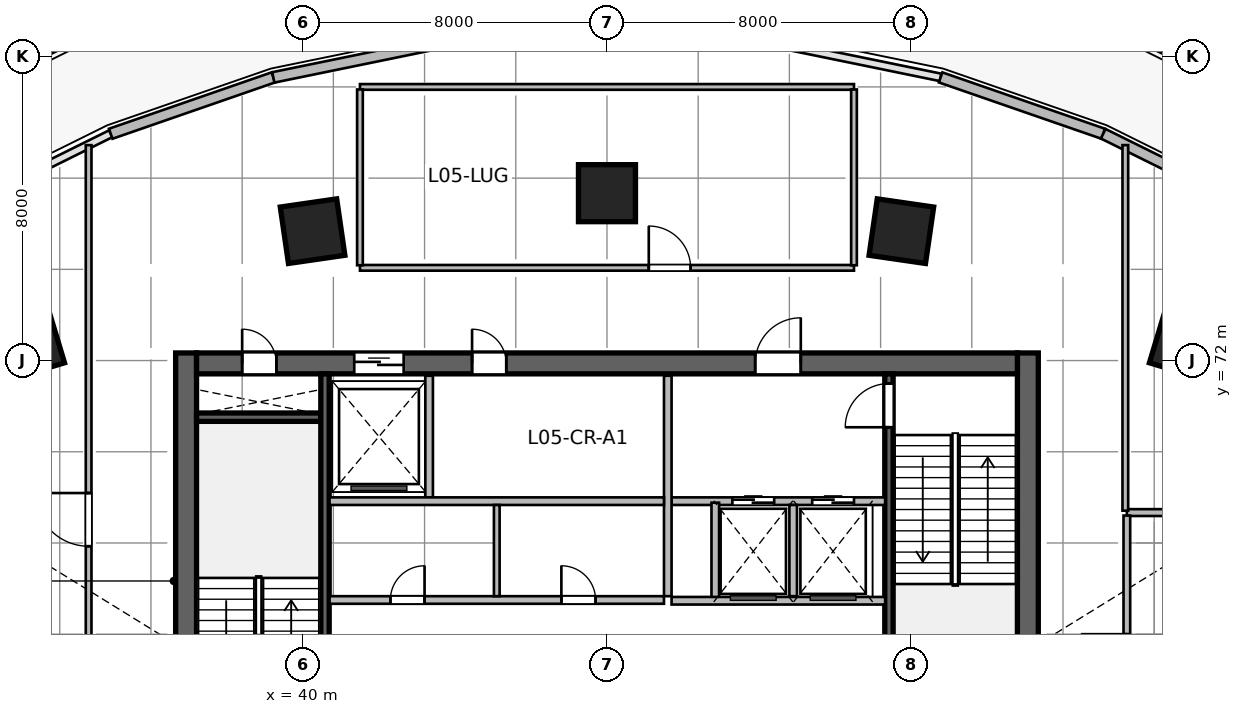
"""IFC4 building model, lengths in metres.
Left out: names, types, materials, properties, quantities, classifications, styles, units other than length and angle.
Written with IfcOpenShell. Run it as: python <this file> out.ifc"""

import sys

from ifc_helpers import new_model, si_unit, direction, frame, frame_2d, origin, origin_2d, place, context, subcontext, project, spatial, rectangle, extrude, source, transform, mapped, element, fill, save


model = new_model("IFC4")
c1 = context("Model", 3, precision=1e-05, world=origin(), true_north=direction((0.0, 1.0)))
c2 = subcontext(c1, "Body", "Model", "MODEL_VIEW")
j1 = project(units=[si_unit("LENGTHUNIT", "METRE"), si_unit("PLANEANGLEUNIT", "RADIAN")], contexts=[c1])
p1 = place(None, origin())
s1 = spatial("IfcSite", under=j1, at=p1, CompositionType="ELEMENT")
p2 = place(p1, origin())
s2 = spatial("IfcBuilding", under=s1, at=p2, CompositionType="ELEMENT")
p3 = place(p2, frame((0.0, 0.0, 30.0)))
s3 = spatial("IfcBuildingStorey", under=s2, at=p3, CompositionType="ELEMENT", Elevation=30.0)
m1 = source(origin(), c2, "Body", "SweptSolid", [
    extrude(rectangle(XDim=12.0, YDim=0.55, at=frame_2d((6.0, 0.0))), origin(), (0.0, 0.0, 1.0), 5.4),
])
for number, where, z_axis, x_axis in (
    (1, (36.925, 60.2, 0.0), (0.0, 0.0, 1.0), (0.0, 1.0, 0.0)),
    (2, (59.075, 60.2, 0.0), (0.0, 0.0, 1.0), (0.0, 1.0, 0.0)),
):
    element("IfcWall", number, at=place(p3, frame(where, z_axis=z_axis, x_axis=x_axis)), inside=s3, PredefinedType="SHEAR", context=c2, shape_type="MappedRepresentation", body=[
        mapped(m1, transform((0.0, 0.0, 0.0), scale=1.0)),
    ])
m2 = source(origin(), c2, "Body", "SweptSolid", [
    extrude(rectangle(XDim=21.6, YDim=0.55, at=frame_2d((10.8, 0.0))), origin(), (0.0, 0.0, 1.0), 5.4),
])
p4 = place(p3, frame((37.2, 71.925, 0.0), z_axis=(0.0, 0.0, 1.0), x_axis=(1.0, 0.0, 0.0)))
e3 = element("IfcWall", 3, at=p4, inside=s3, PredefinedType="SHEAR", context=c2, shape_type="MappedRepresentation", body=[
    mapped(m2, transform((0.0, 0.0, 0.0), scale=1.0)),
])
p5 = place(p4, frame((1.2, 0.0, 0.0)))
e4 = element("IfcOpeningElement", 4, at=p5, cuts=e3, PredefinedType="OPENING", context=c2, shape_type="SweptSolid", body=[
    extrude(rectangle(XDim=0.9, YDim=2.1, at=frame_2d((0.45, 1.05))), frame((0.0, 0.285, 0.0), z_axis=(0.0, -1.0, 0.0), x_axis=(1.0, 0.0, 0.0)), (0.0, 0.0, 1.0), 0.57),
])
p6 = place(p4, frame((14.7, 0.0, 0.0)))
e5 = element("IfcOpeningElement", 5, at=p6, cuts=e3, PredefinedType="OPENING", context=c2, shape_type="SweptSolid", body=[
    extrude(rectangle(XDim=1.2, YDim=2.15, at=frame_2d((0.6, 1.075))), frame((0.0, 0.285, 0.0), z_axis=(0.0, -1.0, 0.0), x_axis=(1.0, 0.0, 0.0)), (0.0, 0.0, 1.0), 0.57),
])
p7 = place(p4, frame((4.15, 0.0, 0.0)))
e6 = element("IfcOpeningElement", 6, at=p7, cuts=e3, PredefinedType="OPENING", context=c2, shape_type="SweptSolid", body=[
    extrude(rectangle(XDim=1.3, YDim=2.15, at=frame_2d((0.65, 1.075))), frame((0.0, 0.285, 0.0), z_axis=(0.0, -1.0, 0.0), x_axis=(1.0, 0.0, 0.0)), (0.0, 0.0, 1.0), 0.57),
])
p8 = place(p4, frame((7.25, 0.0, 0.0)))
e7 = element("IfcOpeningElement", 7, at=p8, cuts=e3, PredefinedType="OPENING", context=c2, shape_type="SweptSolid", body=[
    extrude(rectangle(XDim=0.9, YDim=2.1, at=frame_2d((0.45, 1.05))), frame((0.0, 0.285, 0.0), z_axis=(0.0, -1.0, 0.0), x_axis=(1.0, 0.0, 0.0)), (0.0, 0.0, 1.0), 0.57),
])
m3 = source(origin(), c2, "Body", "SweptSolid", [
    extrude(rectangle(XDim=3.27, YDim=0.22, at=frame_2d((1.635, 0.0))), origin(), (0.0, 0.0, 1.0), 5.4),
])
p9 = place(p3, frame((37.2, 70.51, 0.0), z_axis=(0.0, 0.0, 1.0), x_axis=(1.0, 0.0, 0.0)))
e8 = element("IfcWall", 8, at=p9, inside=s3, PredefinedType="SHEAR", context=c2, shape_type="MappedRepresentation", body=[
    mapped(m3, transform((0.0, 0.0, 0.0), scale=1.0)),
])
m4 = source(origin(), c2, "Body", "SweptSolid", [
    extrude(rectangle(XDim=10.9, YDim=0.22, at=frame_2d((5.45, 0.0))), origin(), (0.0, 0.0, 1.0), 5.4),
])
p10 = place(p3, frame((40.58, 60.75, 0.0), z_axis=(0.0, 0.0, 1.0), x_axis=(0.0, 1.0, 0.0)))
e9 = element("IfcWall", 9, at=p10, inside=s3, PredefinedType="SHEAR", context=c2, shape_type="MappedRepresentation", body=[
    mapped(m4, transform((0.0, 0.0, 0.0), scale=1.0)),
])
p11 = place(p3, frame((55.42, 60.75, 0.0), z_axis=(0.0, 0.0, 1.0), x_axis=(0.0, 1.0, 0.0)))
e10 = element("IfcWall", 10, at=p11, inside=s3, PredefinedType="SHEAR", context=c2, shape_type="MappedRepresentation", body=[
    mapped(m4, transform((0.0, 0.0, 0.0), scale=1.0)),
])
p12 = place(p11, frame((9.495, 0.0, 0.0)))
e11 = element("IfcOpeningElement", 11, at=p12, cuts=e10, PredefinedType="OPENING", context=c2, shape_type="SweptSolid", body=[
    extrude(rectangle(XDim=1.15, YDim=2.15, at=frame_2d((0.575, 1.075))), frame((0.0, 0.12, 0.0), z_axis=(0.0, -1.0, 0.0), x_axis=(1.0, 0.0, 0.0)), (0.0, 0.0, 1.0), 0.24),
])
m5 = source(origin(), c2, "Body", "SweptSolid", [
    extrude(rectangle(XDim=1.5, YDim=1.5, at=origin_2d()), origin(), (0.0, 0.0, 1.0), 5.4),
])
for number, where, z_axis, x_axis in (
    (12, (32.791, 72.442, 0.0), (0.0, 0.0, 1.0), (-0.289, 0.957, 0.0)),
    (13, (40.253, 75.404, 0.0), (0.0, 0.0, 1.0), (-0.143, 0.99, 0.0)),
    (14, (48.0, 76.404, 0.0), (0.0, 0.0, 1.0), (0.0, 1.0, 0.0)),
    (15, (55.747, 75.404, 0.0), (0.0, 0.0, 1.0), (0.143, 0.99, 0.0)),
    (16, (63.209, 72.442, 0.0), (0.0, 0.0, 1.0), (0.289, 0.957, 0.0)),
):
    element("IfcColumn", number, at=place(p3, frame(where, z_axis=z_axis, x_axis=x_axis)), inside=s3, PredefinedType="COLUMN", context=c2, shape_type="MappedRepresentation", body=[
        mapped(m5, transform((0.0, 0.0, 0.0), scale=1.0)),
    ])
m6 = source(origin(), c2, "Body", "SweptSolid", [
    extrude(rectangle(XDim=4.528, YDim=0.28, at=frame_2d((2.264, 0.0))), origin(), (0.0, 0.0, 1.0), 5.16),
])
p13 = place(p3, frame((34.942, 77.968, 0.0), z_axis=(0.0, 0.0, 1.0), x_axis=(0.944875124863, 0.327430906322, 0.0)))
e17 = element("IfcWall", 17, at=p13, inside=s3, PredefinedType="SOLIDWALL", context=c2, shape_type="MappedRepresentation", body=[
    mapped(m6, transform((0.0, 0.0, 0.0), scale=1.0)),
])
m7 = source(origin(), c2, "Body", "SweptSolid", [
    extrude(rectangle(XDim=4.458, YDim=0.28, at=frame_2d((2.229, 0.0))), origin(), (0.0, 0.0, 1.0), 5.16),
])
p14 = place(p3, frame((39.22, 79.45, 0.0), z_axis=(0.0, 0.0, 1.0), x_axis=(0.979608504488, 0.200915847893, 0.0)))
e18 = element("IfcWall", 18, at=p14, inside=s3, PredefinedType="SOLIDWALL", context=c2, shape_type="MappedRepresentation", body=[
    mapped(m7, transform((0.0, 0.0, 0.0), scale=1.0)),
])
p15 = place(p3, frame((56.78, 79.45, 0.0), z_axis=(0.0, 0.0, 1.0), x_axis=(0.944875124863, -0.327430906322, 0.0)))
e19 = element("IfcWall", 19, at=p15, inside=s3, PredefinedType="SOLIDWALL", context=c2, shape_type="MappedRepresentation", body=[
    mapped(m6, transform((0.0, 0.0, 0.0), scale=1.0)),
])
m8 = source(origin(), c2, "Body", "SweptSolid", [
    extrude(rectangle(XDim=4.628, YDim=0.28, at=frame_2d((2.314, 0.0))), origin(), (0.0, 0.0, 1.0), 5.16),
])
p16 = place(p3, frame((61.058, 77.968, 0.0), z_axis=(0.0, 0.0, 1.0), x_axis=(0.895972868577, -0.444108791597, 0.0)))
e20 = element("IfcWall", 20, at=p16, inside=s3, PredefinedType="SOLIDWALL", context=c2, shape_type="MappedRepresentation", body=[
    mapped(m8, transform((0.0, 0.0, 0.0), scale=1.0)),
])
m9 = source(origin(), c2, "Body", "SweptSolid", [
    extrude(rectangle(XDim=5.62, YDim=0.2, at=frame_2d((2.81, 0.0))), origin(), (0.0, 0.0, 1.0), 5.16),
])
p17 = place(p3, frame((49.7, 68.3, 0.0), z_axis=(0.0, 0.0, 1.0), x_axis=(1.0, 0.0, 0.0)))
e21 = element("IfcWall", 21, at=p17, inside=s3, PredefinedType="SOLIDWALL", context=c2, shape_type="MappedRepresentation", body=[
    mapped(m9, transform((0.0, 0.0, 0.0), scale=1.0)),
])
p18 = place(p17, frame((1.6, 0.0, 0.0)))
e22 = element("IfcOpeningElement", 22, at=p18, cuts=e21, PredefinedType="OPENING", context=c2, shape_type="SweptSolid", body=[
    extrude(rectangle(XDim=1.1, YDim=2.15, at=frame_2d((0.55, 1.075))), frame((0.0, 0.11, 0.0), z_axis=(0.0, -1.0, 0.0), x_axis=(1.0, 0.0, 0.0)), (0.0, 0.0, 1.0), 0.22),
])
p19 = place(p17, frame((3.7, 0.0, 0.0)))
e23 = element("IfcOpeningElement", 23, at=p19, cuts=e21, PredefinedType="OPENING", context=c2, shape_type="SweptSolid", body=[
    extrude(rectangle(XDim=1.1, YDim=2.15, at=frame_2d((0.55, 1.075))), frame((0.0, 0.11, 0.0), z_axis=(0.0, -1.0, 0.0), x_axis=(1.0, 0.0, 0.0)), (0.0, 0.0, 1.0), 0.22),
])
m10 = source(origin(), c2, "Body", "SweptSolid", [
    extrude(rectangle(XDim=5.8, YDim=0.2, at=frame_2d((2.9, 0.0))), origin(), (0.0, 0.0, 1.0), 5.16),
])
p20 = place(p3, frame((49.6, 65.8, 0.0), z_axis=(0.0, 0.0, 1.0), x_axis=(0.0, 1.0, 0.0)))
e24 = element("IfcWall", 24, at=p20, inside=s3, PredefinedType="SOLIDWALL", context=c2, shape_type="MappedRepresentation", body=[
    mapped(m10, transform((0.0, 0.0, 0.0), scale=1.0)),
])
m11 = source(origin(), c2, "Body", "SweptSolid", [
    extrude(rectangle(XDim=2.58, YDim=0.2, at=frame_2d((1.29, 0.0))), origin(), (0.0, 0.0, 1.0), 5.16),
])
p21 = place(p3, frame((50.85, 65.68, 0.0), z_axis=(0.0, 0.0, 1.0), x_axis=(0.0, 1.0, 0.0)))
e25 = element("IfcWall", 25, at=p21, inside=s3, PredefinedType="SOLIDWALL", context=c2, shape_type="MappedRepresentation", body=[
    mapped(m11, transform((0.0, 0.0, 0.0), scale=1.0)),
])
m12 = source(origin(), c2, "Body", "SweptSolid", [
    extrude(rectangle(XDim=2.4, YDim=0.2, at=frame_2d((1.2, 0.0))), origin(), (0.0, 0.0, 1.0), 5.16),
])
p22 = place(p3, frame((52.9, 65.8, 0.0), z_axis=(0.0, 0.0, 1.0), x_axis=(0.0, 1.0, 0.0)))
e26 = element("IfcWall", 26, at=p22, inside=s3, PredefinedType="SOLIDWALL", context=c2, shape_type="MappedRepresentation", body=[
    mapped(m12, transform((0.0, 0.0, 0.0), scale=1.0)),
])
p23 = place(p3, frame((49.7, 65.68, 0.0), z_axis=(0.0, 0.0, 1.0), x_axis=(1.0, 0.0, 0.0)))
e27 = element("IfcWall", 27, at=p23, inside=s3, PredefinedType="SOLIDWALL", context=c2, shape_type="MappedRepresentation", body=[
    mapped(m9, transform((0.0, 0.0, 0.0), scale=1.0)),
])
m13 = source(origin(), c2, "Body", "SweptSolid", [
    extrude(rectangle(XDim=3.2, YDim=0.2, at=frame_2d((1.6, 0.0))), origin(), (0.0, 0.0, 1.0), 5.16),
])
p24 = place(p3, frame((43.32, 68.4, 0.0), z_axis=(0.0, 0.0, 1.0), x_axis=(0.0, 1.0, 0.0)))
e28 = element("IfcWall", 28, at=p24, inside=s3, PredefinedType="SOLIDWALL", context=c2, shape_type="MappedRepresentation", body=[
    mapped(m13, transform((0.0, 0.0, 0.0), scale=1.0)),
])
m14 = source(origin(), c2, "Body", "SweptSolid", [
    extrude(rectangle(XDim=8.8, YDim=0.2, at=frame_2d((4.4, 0.0))), origin(), (0.0, 0.0, 1.0), 5.16),
])
p25 = place(p3, frame((40.7, 68.3, 0.0), z_axis=(0.0, 0.0, 1.0), x_axis=(1.0, 0.0, 0.0)))
e29 = element("IfcWall", 29, at=p25, inside=s3, PredefinedType="SOLIDWALL", context=c2, shape_type="MappedRepresentation", body=[
    mapped(m14, transform((0.0, 0.0, 0.0), scale=1.0)),
])
p26 = place(p3, frame((40.7, 65.7, 0.0), z_axis=(0.0, 0.0, 1.0), x_axis=(1.0, 0.0, 0.0)))
e30 = element("IfcWall", 30, at=p26, inside=s3, PredefinedType="SOLIDWALL", context=c2, shape_type="MappedRepresentation", body=[
    mapped(m14, transform((0.0, 0.0, 0.0), scale=1.0)),
])
p27 = place(p26, frame((1.6, 0.0, 0.0)))
e31 = element("IfcOpeningElement", 31, at=p27, cuts=e30, PredefinedType="OPENING", context=c2, shape_type="SweptSolid", body=[
    extrude(rectangle(XDim=0.9, YDim=2.1, at=frame_2d((0.45, 1.05))), frame((0.0, 0.11, 0.0), z_axis=(0.0, -1.0, 0.0), x_axis=(1.0, 0.0, 0.0)), (0.0, 0.0, 1.0), 0.22),
])
p28 = place(p26, frame((6.1, 0.0, 0.0)))
e32 = element("IfcOpeningElement", 32, at=p28, cuts=e30, PredefinedType="OPENING", context=c2, shape_type="SweptSolid", body=[
    extrude(rectangle(XDim=0.9, YDim=2.1, at=frame_2d((0.45, 1.05))), frame((0.0, 0.11, 0.0), z_axis=(0.0, -1.0, 0.0), x_axis=(1.0, 0.0, 0.0)), (0.0, 0.0, 1.0), 0.22),
])
m15 = source(origin(), c2, "Body", "SweptSolid", [
    extrude(rectangle(XDim=2.4, YDim=0.15, at=frame_2d((1.2, 0.0))), origin(), (0.0, 0.0, 1.0), 5.16),
])
p29 = place(p3, frame((45.1, 65.8, 0.0), z_axis=(0.0, 0.0, 1.0), x_axis=(0.0, 1.0, 0.0)))
e33 = element("IfcWall", 33, at=p29, inside=s3, PredefinedType="PARTITIONING", context=c2, shape_type="MappedRepresentation", body=[
    mapped(m15, transform((0.0, 0.0, 0.0), scale=1.0)),
])
m16 = source(origin(), c2, "Body", "SweptSolid", [
    extrude(rectangle(XDim=9.82, YDim=0.18, at=frame_2d((4.91, 0.0))), origin(), (0.0, 0.0, 1.0), 5.16),
])
p30 = place(p3, frame((61.68, 68.0, 0.0), z_axis=(0.0, 0.0, 1.0), x_axis=(1.0, 0.0, 0.0)))
e34 = element("IfcWall", 34, at=p30, inside=s3, PredefinedType="PLUMBINGWALL", context=c2, shape_type="MappedRepresentation", body=[
    mapped(m16, transform((0.0, 0.0, 0.0), scale=1.0)),
])
m17 = source(origin(), c2, "Body", "SweptSolid", [
    extrude(rectangle(XDim=7.443, YDim=0.175, at=frame_2d((3.721, 0.0))), origin(), (0.0, 0.0, 1.0), 5.16),
])
p31 = place(p3, frame((61.68, 60.479, 0.0), z_axis=(0.0, 0.0, 1.0), x_axis=(0.0, 1.0, 0.0)))
e35 = element("IfcWall", 35, at=p31, inside=s3, PredefinedType="PARTITIONING", context=c2, shape_type="MappedRepresentation", body=[
    mapped(m17, transform((0.0, 0.0, 0.0), scale=1.0)),
])
p32 = place(p31, frame((3.121, 0.0, 0.0)))
e36 = element("IfcOpeningElement", 36, at=p32, cuts=e35, PredefinedType="OPENING", context=c2, shape_type="SweptSolid", body=[
    extrude(rectangle(XDim=1.2, YDim=2.15, at=frame_2d((0.6, 1.075))), frame((0.0, 0.098, 0.0), z_axis=(0.0, -1.0, 0.0), x_axis=(1.0, 0.0, 0.0)), (0.0, 0.0, 1.0), 0.195),
])
m18 = source(origin(), c2, "Body", "SweptSolid", [
    extrude(rectangle(XDim=13.0, YDim=0.15, at=frame_2d((6.5, 0.0))), origin(), (0.0, 0.0, 1.0), 5.16),
])
p33 = place(p3, frame((41.5, 74.44, 0.0), z_axis=(0.0, 0.0, 1.0), x_axis=(1.0, 0.0, 0.0)))
e37 = element("IfcWall", 37, at=p33, inside=s3, PredefinedType="PARTITIONING", context=c2, shape_type="MappedRepresentation", body=[
    mapped(m18, transform((0.0, 0.0, 0.0), scale=1.0)),
])
p34 = place(p33, frame((7.6, 0.0, 0.0)))
e38 = element("IfcOpeningElement", 38, at=p34, cuts=e37, PredefinedType="OPENING", context=c2, shape_type="SweptSolid", body=[
    extrude(rectangle(XDim=1.1, YDim=2.15, at=frame_2d((0.55, 1.075))), frame((0.0, 0.085, 0.0), z_axis=(0.0, -1.0, 0.0), x_axis=(1.0, 0.0, 0.0)), (0.0, 0.0, 1.0), 0.17),
])
p35 = place(p3, frame((41.5, 79.2, 0.0), z_axis=(0.0, 0.0, 1.0), x_axis=(1.0, 0.0, 0.0)))
e39 = element("IfcWall", 39, at=p35, inside=s3, PredefinedType="PARTITIONING", context=c2, shape_type="MappedRepresentation", body=[
    mapped(m18, transform((0.0, 0.0, 0.0), scale=1.0)),
])
m19 = source(origin(), c2, "Body", "SweptSolid", [
    extrude(rectangle(XDim=4.625, YDim=0.15, at=frame_2d((2.312, 0.0))), origin(), (0.0, 0.0, 1.0), 5.16),
])
for number, where, z_axis, x_axis in (
    (40, (41.5, 74.508, 0.0), (0.0, 0.0, 1.0), (0.0, 1.0, 0.0)),
    (41, (54.5, 74.508, 0.0), (0.0, 0.0, 1.0), (0.0, 1.0, 0.0)),
):
    element("IfcWall", number, at=place(p3, frame(where, z_axis=z_axis, x_axis=x_axis)), inside=s3, PredefinedType="PARTITIONING", context=c2, shape_type="MappedRepresentation", body=[
        mapped(m19, transform((0.0, 0.0, 0.0), scale=1.0)),
    ])
m20 = source(origin(), c2, "Body", "SweptSolid", [
    extrude(rectangle(XDim=19.708, YDim=0.15, at=frame_2d((9.854, 0.0))), origin(), (0.0, 0.0, 1.0), 5.16),
])
p36 = place(p3, frame((34.36, 57.96, 0.0), z_axis=(0.0, 0.0, 1.0), x_axis=(0.0, 1.0, 0.0)))
e42 = element("IfcWall", 42, at=p36, inside=s3, PredefinedType="PARTITIONING", context=c2, shape_type="MappedRepresentation", body=[
    mapped(m20, transform((0.0, 0.0, 0.0), scale=1.0)),
])
p37 = place(p36, frame((9.154, 0.0, 0.0)))
e43 = element("IfcOpeningElement", 43, at=p37, cuts=e42, PredefinedType="OPENING", context=c2, shape_type="SweptSolid", body=[
    extrude(rectangle(XDim=1.4, YDim=2.15, at=frame_2d((0.7, 1.075))), frame((0.0, 0.085, 0.0), z_axis=(0.0, -1.0, 0.0), x_axis=(1.0, 0.0, 0.0)), (0.0, 0.0, 1.0), 0.17),
])
m21 = source(origin(), c2, "Body", "SweptSolid", [
    extrude(rectangle(XDim=9.618, YDim=0.15, at=frame_2d((4.809, 0.0))), origin(), (0.0, 0.0, 1.0), 5.16),
])
p38 = place(p3, frame((61.64, 68.05, 0.0), z_axis=(0.0, 0.0, 1.0), x_axis=(0.0, 1.0, 0.0)))
e44 = element("IfcWall", 44, at=p38, inside=s3, PredefinedType="PARTITIONING", context=c2, shape_type="MappedRepresentation", body=[
    mapped(m21, transform((0.0, 0.0, 0.0), scale=1.0)),
])
m22 = source(origin(), c2, "Body", "SweptSolid", [
    extrude(rectangle(XDim=0.9, YDim=2.1, at=frame_2d((0.45, 1.05))), frame((0.0, 0.025, 0.0), z_axis=(0.0, -1.0, 0.0), x_axis=(1.0, 0.0, 0.0)), (0.0, 0.0, 1.0), 0.05),
])
p39 = place(p5, origin())
e45 = element("IfcDoor", 45, at=p39, inside=s3, OperationType="SINGLE_SWING_LEFT", PredefinedType="DOOR", context=c2, shape_type="MappedRepresentation", body=[
    mapped(m22, transform((0.0, 0.0, 0.0), scale=1.0)),
])
fill(e4, e45)
m23 = source(origin(), c2, "Body", "SweptSolid", [
    extrude(rectangle(XDim=1.15, YDim=2.15, at=frame_2d((0.575, 1.075))), frame((0.0, 0.025, 0.0), z_axis=(0.0, -1.0, 0.0), x_axis=(1.0, 0.0, 0.0)), (0.0, 0.0, 1.0), 0.05),
])
p40 = place(p12, origin())
e46 = element("IfcDoor", 46, at=p40, inside=s3, OperationType="SINGLE_SWING_LEFT", PredefinedType="DOOR", context=c2, shape_type="MappedRepresentation", body=[
    mapped(m23, transform((0.0, 0.0, 0.0), scale=1.0)),
])
fill(e11, e46)
m24 = source(origin(), c2, "Body", "SweptSolid", [
    extrude(rectangle(XDim=1.2, YDim=2.15, at=frame_2d((0.6, 1.075))), frame((0.0, 0.025, 0.0), z_axis=(0.0, -1.0, 0.0), x_axis=(1.0, 0.0, 0.0)), (0.0, 0.0, 1.0), 0.05),
])
p41 = place(p6, origin())
e47 = element("IfcDoor", 47, at=p41, inside=s3, OperationType="SINGLE_SWING_RIGHT", PredefinedType="DOOR", context=c2, shape_type="MappedRepresentation", body=[
    mapped(m24, transform((0.0, 0.0, 0.0), scale=1.0)),
])
fill(e5, e47)
m25 = source(origin(), c2, "Body", "SweptSolid", [
    extrude(rectangle(XDim=1.1, YDim=2.15, at=frame_2d((0.55, 1.075))), frame((0.0, 0.025, 0.0), z_axis=(0.0, -1.0, 0.0), x_axis=(1.0, 0.0, 0.0)), (0.0, 0.0, 1.0), 0.05),
])
p42 = place(p18, origin())
e48 = element("IfcDoor", 48, at=p42, inside=s3, OperationType="DOUBLE_DOOR_SLIDING", PredefinedType="DOOR", context=c2, shape_type="MappedRepresentation", body=[
    mapped(m25, transform((0.0, 0.0, 0.0), scale=1.0)),
])
fill(e22, e48)
p43 = place(p19, origin())
e49 = element("IfcDoor", 49, at=p43, inside=s3, OperationType="DOUBLE_DOOR_SLIDING", PredefinedType="DOOR", context=c2, shape_type="MappedRepresentation", body=[
    mapped(m25, transform((0.0, 0.0, 0.0), scale=1.0)),
])
fill(e23, e49)
m26 = source(origin(), c2, "Body", "SweptSolid", [
    extrude(rectangle(XDim=1.3, YDim=2.15, at=frame_2d((0.65, 1.075))), frame((0.0, 0.025, 0.0), z_axis=(0.0, -1.0, 0.0), x_axis=(1.0, 0.0, 0.0)), (0.0, 0.0, 1.0), 0.05),
])
p44 = place(p7, origin())
e50 = element("IfcDoor", 50, at=p44, inside=s3, OperationType="DOUBLE_DOOR_SLIDING", PredefinedType="DOOR", context=c2, shape_type="MappedRepresentation", body=[
    mapped(m26, transform((0.0, 0.0, 0.0), scale=1.0)),
])
fill(e6, e50)
p45 = place(p8, origin())
e51 = element("IfcDoor", 51, at=p45, inside=s3, OperationType="SINGLE_SWING_LEFT", PredefinedType="DOOR", context=c2, shape_type="MappedRepresentation", body=[
    mapped(m22, transform((0.0, 0.0, 0.0), scale=1.0)),
])
fill(e7, e51)
p46 = place(p27, origin())
e52 = element("IfcDoor", 52, at=p46, inside=s3, OperationType="SINGLE_SWING_RIGHT", PredefinedType="DOOR", context=c2, shape_type="MappedRepresentation", body=[
    mapped(m22, transform((0.0, 0.0, 0.0), scale=1.0)),
])
fill(e31, e52)
p47 = place(p28, origin())
e53 = element("IfcDoor", 53, at=p47, inside=s3, OperationType="SINGLE_SWING_LEFT", PredefinedType="DOOR", context=c2, shape_type="MappedRepresentation", body=[
    mapped(m22, transform((0.0, 0.0, 0.0), scale=1.0)),
])
fill(e32, e53)
m27 = source(origin(), c2, "Body", "SweptSolid", [
    extrude(rectangle(XDim=1.1, YDim=2.15, at=frame_2d((0.55, 1.075))), frame((0.0, 0.025, 0.0), z_axis=(0.0, -1.0, 0.0), x_axis=(1.0, 0.0, 0.0)), (0.0, 0.0, 1.0), 0.05),
])
p48 = place(p34, origin())
e54 = element("IfcDoor", 54, at=p48, inside=s3, OperationType="SINGLE_SWING_LEFT", PredefinedType="DOOR", context=c2, shape_type="MappedRepresentation", body=[
    mapped(m27, transform((0.0, 0.0, 0.0), scale=1.0)),
])
fill(e38, e54)
m28 = source(origin(), c2, "Body", "SweptSolid", [
    extrude(rectangle(XDim=1.4, YDim=2.15, at=frame_2d((0.7, 1.075))), frame((0.0, 0.025, 0.0), z_axis=(0.0, -1.0, 0.0), x_axis=(1.0, 0.0, 0.0)), (0.0, 0.0, 1.0), 0.05),
])
p49 = place(p37, origin())
e55 = element("IfcDoor", 55, at=p49, inside=s3, OperationType="SINGLE_SWING_RIGHT", PredefinedType="DOOR", context=c2, shape_type="MappedRepresentation", body=[
    mapped(m28, transform((0.0, 0.0, 0.0), scale=1.0)),
])
fill(e43, e55)
save(model, sys.argv[1])
